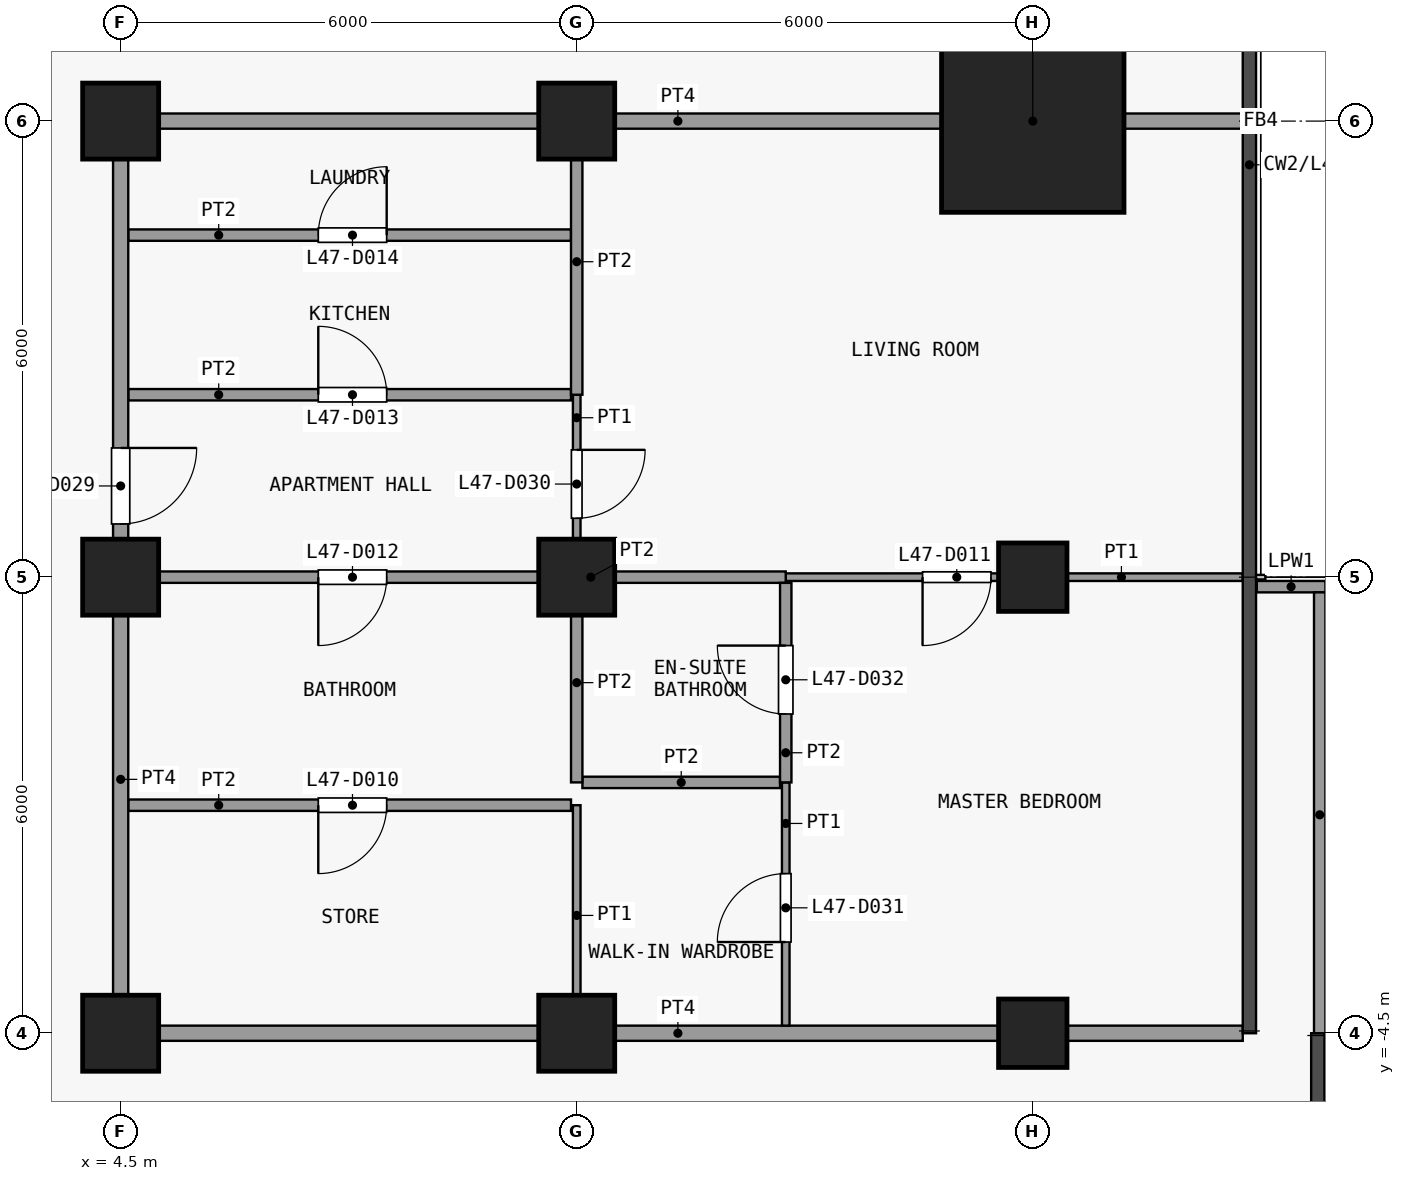
"""IFC4 building model, lengths in metres.
Left out: names, types, materials, properties, quantities, classifications, styles, units other than length and angle.
Written with IfcOpenShell. Run it as: python <this file> out.ifc"""

import sys

from ifc_helpers import new_model, si_unit, direction, frame, frame_2d, origin, origin_2d, place, context, subcontext, project, spatial, rectangle, extrude, element, fill, save


model = new_model("IFC4")
c1 = context("Model", 3, precision=1e-05, world=origin(), true_north=direction((0.0, 1.0)))
c2 = subcontext(c1, "Body", "Model", "MODEL_VIEW")
j1 = project(units=[si_unit("LENGTHUNIT", "METRE"), si_unit("PLANEANGLEUNIT", "RADIAN")], contexts=[c1])
p1 = place(None, origin())
s1 = spatial("IfcSite", under=j1, at=p1, CompositionType="ELEMENT")
p2 = place(p1, origin())
s2 = spatial("IfcBuilding", under=s1, at=p2, CompositionType="ELEMENT")
p3 = place(p2, frame((0.0, 0.0, 188.9)))
s3 = spatial("IfcBuildingStorey", under=s2, at=p3, CompositionType="ELEMENT", Elevation=188.9)
for number, where, z_axis, x_axis in (
    (1, (4.5, -4.5, 0.0), (0.0, 0.0, 1.0), (1.0, 0.0, 0.0)),
    (2, (4.5, 1.5, 0.0), (0.0, 0.0, 1.0), (1.0, 0.0, 0.0)),
    (3, (4.5, 7.5, 0.0), (0.0, 0.0, 1.0), (1.0, 0.0, 0.0)),
    (4, (10.5, -4.5, 0.0), (0.0, 0.0, 1.0), (1.0, 0.0, 0.0)),
    (5, (10.5, 1.5, 0.0), (0.0, 0.0, 1.0), (1.0, 0.0, 0.0)),
    (6, (10.5, 7.5, 0.0), (0.0, 0.0, 1.0), (1.0, 0.0, 0.0)),
):
    element("IfcColumn", number, at=place(p3, frame(where, z_axis=z_axis, x_axis=x_axis)), inside=s3, PredefinedType="COLUMN", context=c2, shape_type="SweptSolid", body=[
        extrude(rectangle(XDim=1.0, YDim=1.0, at=origin_2d()), origin(), (0.0, 0.0, 1.0), 3.6),
    ])
for number, where, z_axis, x_axis in (
    (7, (16.5, -4.5, 0.0), (0.0, 0.0, 1.0), (1.0, 0.0, 0.0)),
    (8, (16.5, 1.5, 0.0), (0.0, 0.0, 1.0), (1.0, 0.0, 0.0)),
):
    element("IfcColumn", number, at=place(p3, frame(where, z_axis=z_axis, x_axis=x_axis)), inside=s3, PredefinedType="COLUMN", context=c2, shape_type="SweptSolid", body=[
        extrude(rectangle(XDim=0.9, YDim=0.9, at=origin_2d()), origin(), (0.0, 0.0, 1.0), 3.6),
    ])
p4 = place(p3, frame((16.5, 7.5, 0.0), z_axis=(0.0, 0.0, 1.0), x_axis=(1.0, 0.0, 0.0)))
e9 = element("IfcColumn", 9, at=p4, inside=s3, PredefinedType="COLUMN", context=c2, shape_type="SweptSolid", body=[
    extrude(rectangle(XDim=2.4, YDim=2.4, at=origin_2d()), origin(), (0.0, 0.0, 1.0), 3.6),
])
p5 = place(p3, frame((19.448, 1.375, 0.0), z_axis=(0.0, 0.0, 1.0), x_axis=(1.0, 0.0, 0.0)))
e10 = element("IfcWall", 10, at=p5, inside=s3, PredefinedType="PARAPET", context=c2, shape_type="SweptSolid", body=[
    extrude(rectangle(XDim=0.903, YDim=0.15, at=frame_2d((0.451, 0.0))), origin(), (0.0, 0.0, 1.0), 1.15),
])
p6 = place(p3, frame((20.275, 1.3, 0.0), z_axis=(0.0, 0.0, 1.0), x_axis=(0.0, -1.0, 0.0)))
e11 = element("IfcWall", 11, at=p6, inside=s3, PredefinedType="PARAPET", context=c2, shape_type="SweptSolid", body=[
    extrude(rectangle(XDim=5.853, YDim=0.15, at=frame_2d((2.926, 0.0))), origin(), (0.0, 0.0, 1.0), 1.15),
])
p7 = place(p3, frame((4.4, -4.5, 0.0), z_axis=(0.0, 0.0, 1.0), x_axis=(1.0, 0.0, 0.0)))
e12 = element("IfcWall", 12, at=p7, inside=s3, PredefinedType="PARTITIONING", context=c2, shape_type="SweptSolid", body=[
    extrude(rectangle(XDim=14.863, YDim=0.2, at=frame_2d((7.431, 0.0))), origin(), (0.0, 0.0, 1.0), 3.3),
])
p8 = place(p3, frame((4.6, -1.5, 0.0), z_axis=(0.0, 0.0, 1.0), x_axis=(1.0, 0.0, 0.0)))
e13 = element("IfcWall", 13, at=p8, inside=s3, PredefinedType="PARTITIONING", context=c2, shape_type="SweptSolid", body=[
    extrude(rectangle(XDim=5.825, YDim=0.15, at=frame_2d((2.913, 0.0))), origin(), (0.0, 0.0, 1.0), 3.3),
])
p9 = place(p8, frame((2.5, 0.0, 0.0)))
e14 = element("IfcOpeningElement", 14, at=p9, cuts=e13, PredefinedType="OPENING", context=c2, shape_type="SweptSolid", body=[
    extrude(rectangle(XDim=0.9, YDim=2.1, at=frame_2d((0.45, 1.05))), frame((0.0, 0.085, 0.0), z_axis=(0.0, -1.0, 0.0), x_axis=(1.0, 0.0, 0.0)), (0.0, 0.0, 1.0), 0.17),
])
p10 = place(p3, frame((10.575, -1.2, 0.0), z_axis=(0.0, 0.0, 1.0), x_axis=(1.0, 0.0, 0.0)))
e15 = element("IfcWall", 15, at=p10, inside=s3, PredefinedType="PARTITIONING", context=c2, shape_type="SweptSolid", body=[
    extrude(rectangle(XDim=2.6, YDim=0.15, at=frame_2d((1.3, 0.0))), origin(), (0.0, 0.0, 1.0), 3.3),
])
p11 = place(p3, frame((13.25, 1.5, 0.0), z_axis=(0.0, 0.0, 1.0), x_axis=(1.0, 0.0, 0.0)))
e16 = element("IfcWall", 16, at=p11, inside=s3, PredefinedType="PARTITIONING", context=c2, shape_type="SweptSolid", body=[
    extrude(rectangle(XDim=6.012, YDim=0.1, at=frame_2d((3.006, 0.0))), origin(), (0.0, 0.0, 1.0), 3.3),
])
p12 = place(p11, frame((1.8, 0.0, 0.0)))
e17 = element("IfcOpeningElement", 17, at=p12, cuts=e16, PredefinedType="OPENING", context=c2, shape_type="SweptSolid", body=[
    extrude(rectangle(XDim=0.9, YDim=2.1, at=frame_2d((0.45, 1.05))), frame((0.0, 0.06, 0.0), z_axis=(0.0, -1.0, 0.0), x_axis=(1.0, 0.0, 0.0)), (0.0, 0.0, 1.0), 0.12),
])
p13 = place(p3, frame((4.6, 1.5, 0.0), z_axis=(0.0, 0.0, 1.0), x_axis=(1.0, 0.0, 0.0)))
e18 = element("IfcWall", 18, at=p13, inside=s3, PredefinedType="PARTITIONING", context=c2, shape_type="SweptSolid", body=[
    extrude(rectangle(XDim=8.65, YDim=0.15, at=frame_2d((4.325, 0.0))), origin(), (0.0, 0.0, 1.0), 3.3),
])
p14 = place(p13, frame((2.5, 0.0, 0.0)))
e19 = element("IfcOpeningElement", 19, at=p14, cuts=e18, PredefinedType="OPENING", context=c2, shape_type="SweptSolid", body=[
    extrude(rectangle(XDim=0.9, YDim=2.1, at=frame_2d((0.45, 1.05))), frame((0.0, 0.085, 0.0), z_axis=(0.0, -1.0, 0.0), x_axis=(1.0, 0.0, 0.0)), (0.0, 0.0, 1.0), 0.17),
])
p15 = place(p3, frame((4.6, 3.9, 0.0), z_axis=(0.0, 0.0, 1.0), x_axis=(1.0, 0.0, 0.0)))
e20 = element("IfcWall", 20, at=p15, inside=s3, PredefinedType="PARTITIONING", context=c2, shape_type="SweptSolid", body=[
    extrude(rectangle(XDim=5.825, YDim=0.15, at=frame_2d((2.913, 0.0))), origin(), (0.0, 0.0, 1.0), 3.3),
])
p16 = place(p15, frame((2.5, 0.0, 0.0)))
e21 = element("IfcOpeningElement", 21, at=p16, cuts=e20, PredefinedType="OPENING", context=c2, shape_type="SweptSolid", body=[
    extrude(rectangle(XDim=0.9, YDim=2.1, at=frame_2d((0.45, 1.05))), frame((0.0, 0.085, 0.0), z_axis=(0.0, -1.0, 0.0), x_axis=(1.0, 0.0, 0.0)), (0.0, 0.0, 1.0), 0.17),
])
p17 = place(p3, frame((4.6, 6.0, 0.0), z_axis=(0.0, 0.0, 1.0), x_axis=(1.0, 0.0, 0.0)))
e22 = element("IfcWall", 22, at=p17, inside=s3, PredefinedType="PARTITIONING", context=c2, shape_type="SweptSolid", body=[
    extrude(rectangle(XDim=5.825, YDim=0.15, at=frame_2d((2.913, 0.0))), origin(), (0.0, 0.0, 1.0), 3.3),
])
p18 = place(p17, frame((2.5, 0.0, 0.0)))
e23 = element("IfcOpeningElement", 23, at=p18, cuts=e22, PredefinedType="OPENING", context=c2, shape_type="SweptSolid", body=[
    extrude(rectangle(XDim=0.9, YDim=2.1, at=frame_2d((0.45, 1.05))), frame((0.0, 0.085, 0.0), z_axis=(0.0, -1.0, 0.0), x_axis=(1.0, 0.0, 0.0)), (0.0, 0.0, 1.0), 0.17),
])
p19 = place(p3, frame((4.4, 7.5, 0.0), z_axis=(0.0, 0.0, 1.0), x_axis=(1.0, 0.0, 0.0)))
e24 = element("IfcWall", 24, at=p19, inside=s3, PredefinedType="PARTITIONING", context=c2, shape_type="SweptSolid", body=[
    extrude(rectangle(XDim=14.863, YDim=0.2, at=frame_2d((7.431, 0.0))), origin(), (0.0, 0.0, 1.0), 3.3),
])
p20 = place(p3, frame((4.5, -4.4, 0.0), z_axis=(0.0, 0.0, 1.0), x_axis=(0.0, 1.0, 0.0)))
e25 = element("IfcWall", 25, at=p20, inside=s3, PredefinedType="PARTITIONING", context=c2, shape_type="SweptSolid", body=[
    extrude(rectangle(XDim=11.8, YDim=0.2, at=frame_2d((5.9, 0.0))), origin(), (0.0, 0.0, 1.0), 3.3),
])
p21 = place(p20, frame((6.6, 0.0, 0.0)))
e26 = element("IfcOpeningElement", 26, at=p21, cuts=e25, PredefinedType="OPENING", context=c2, shape_type="SweptSolid", body=[
    extrude(rectangle(XDim=1.0, YDim=2.1, at=frame_2d((0.5, 1.05))), frame((0.0, 0.11, 0.0), z_axis=(0.0, -1.0, 0.0), x_axis=(1.0, 0.0, 0.0)), (0.0, 0.0, 1.0), 0.22),
])
p22 = place(p3, frame((10.5, -4.4, 0.0), z_axis=(0.0, 0.0, 1.0), x_axis=(0.0, 1.0, 0.0)))
e27 = element("IfcWall", 27, at=p22, inside=s3, PredefinedType="PARTITIONING", context=c2, shape_type="SweptSolid", body=[
    extrude(rectangle(XDim=2.9, YDim=0.1, at=frame_2d((1.45, 0.0))), origin(), (0.0, 0.0, 1.0), 3.3),
])
p23 = place(p3, frame((10.5, 1.575, 0.0), z_axis=(0.0, 0.0, 1.0), x_axis=(0.0, 1.0, 0.0)))
e28 = element("IfcWall", 28, at=p23, inside=s3, PredefinedType="PARTITIONING", context=c2, shape_type="SweptSolid", body=[
    extrude(rectangle(XDim=2.325, YDim=0.1, at=frame_2d((1.163, 0.0))), origin(), (0.0, 0.0, 1.0), 3.3),
])
p24 = place(p23, frame((0.7, 0.0, 0.0)))
e29 = element("IfcOpeningElement", 29, at=p24, cuts=e28, PredefinedType="OPENING", context=c2, shape_type="SweptSolid", body=[
    extrude(rectangle(XDim=0.9, YDim=2.1, at=frame_2d((0.45, 1.05))), frame((0.0, 0.06, 0.0), z_axis=(0.0, -1.0, 0.0), x_axis=(1.0, 0.0, 0.0)), (0.0, 0.0, 1.0), 0.12),
])
p25 = place(p3, frame((10.5, -1.2, 0.0), z_axis=(0.0, 0.0, 1.0), x_axis=(0.0, 1.0, 0.0)))
e30 = element("IfcWall", 30, at=p25, inside=s3, PredefinedType="PARTITIONING", context=c2, shape_type="SweptSolid", body=[
    extrude(rectangle(XDim=2.625, YDim=0.15, at=frame_2d((1.312, 0.0))), origin(), (0.0, 0.0, 1.0), 3.3),
])
p26 = place(p3, frame((10.5, 3.9, 0.0), z_axis=(0.0, 0.0, 1.0), x_axis=(0.0, 1.0, 0.0)))
e31 = element("IfcWall", 31, at=p26, inside=s3, PredefinedType="PARTITIONING", context=c2, shape_type="SweptSolid", body=[
    extrude(rectangle(XDim=3.5, YDim=0.15, at=frame_2d((1.75, 0.0))), origin(), (0.0, 0.0, 1.0), 3.3),
])
p27 = place(p3, frame((13.25, -4.4, 0.0), z_axis=(0.0, 0.0, 1.0), x_axis=(0.0, 1.0, 0.0)))
e32 = element("IfcWall", 32, at=p27, inside=s3, PredefinedType="PARTITIONING", context=c2, shape_type="SweptSolid", body=[
    extrude(rectangle(XDim=3.2, YDim=0.1, at=frame_2d((1.6, 0.0))), origin(), (0.0, 0.0, 1.0), 3.3),
])
p28 = place(p27, frame((1.1, 0.0, 0.0)))
e33 = element("IfcOpeningElement", 33, at=p28, cuts=e32, PredefinedType="OPENING", context=c2, shape_type="SweptSolid", body=[
    extrude(rectangle(XDim=0.9, YDim=2.1, at=frame_2d((0.45, 1.05))), frame((0.0, 0.06, 0.0), z_axis=(0.0, -1.0, 0.0), x_axis=(1.0, 0.0, 0.0)), (0.0, 0.0, 1.0), 0.12),
])
p29 = place(p3, frame((13.25, -1.2, 0.0), z_axis=(0.0, 0.0, 1.0), x_axis=(0.0, 1.0, 0.0)))
e34 = element("IfcWall", 34, at=p29, inside=s3, PredefinedType="PARTITIONING", context=c2, shape_type="SweptSolid", body=[
    extrude(rectangle(XDim=2.625, YDim=0.15, at=frame_2d((1.312, 0.0))), origin(), (0.0, 0.0, 1.0), 3.3),
])
p30 = place(p29, frame((0.9, 0.0, 0.0)))
e35 = element("IfcOpeningElement", 35, at=p30, cuts=e34, PredefinedType="OPENING", context=c2, shape_type="SweptSolid", body=[
    extrude(rectangle(XDim=0.9, YDim=2.1, at=frame_2d((0.45, 1.05))), frame((0.0, 0.085, 0.0), z_axis=(0.0, -1.0, 0.0), x_axis=(1.0, 0.0, 0.0)), (0.0, 0.0, 1.0), 0.17),
])
p31 = place(p9, origin())
e36 = element("IfcDoor", 36, at=p31, inside=s3, OperationType="SINGLE_SWING_LEFT", PredefinedType="DOOR", context=c2, shape_type="SweptSolid", body=[
    extrude(rectangle(XDim=0.9, YDim=2.1, at=frame_2d((0.45, 1.05))), frame((0.0, 0.025, 0.0), z_axis=(0.0, -1.0, 0.0), x_axis=(1.0, 0.0, 0.0)), (0.0, 0.0, 1.0), 0.05),
])
fill(e14, e36)
p32 = place(p12, origin())
e37 = element("IfcDoor", 37, at=p32, inside=s3, OperationType="SINGLE_SWING_LEFT", PredefinedType="DOOR", context=c2, shape_type="SweptSolid", body=[
    extrude(rectangle(XDim=0.9, YDim=2.1, at=frame_2d((0.45, 1.05))), frame((0.0, 0.025, 0.0), z_axis=(0.0, -1.0, 0.0), x_axis=(1.0, 0.0, 0.0)), (0.0, 0.0, 1.0), 0.05),
])
fill(e17, e37)
p33 = place(p14, origin())
e38 = element("IfcDoor", 38, at=p33, inside=s3, OperationType="SINGLE_SWING_LEFT", PredefinedType="DOOR", context=c2, shape_type="SweptSolid", body=[
    extrude(rectangle(XDim=0.9, YDim=2.1, at=frame_2d((0.45, 1.05))), frame((0.0, 0.025, 0.0), z_axis=(0.0, -1.0, 0.0), x_axis=(1.0, 0.0, 0.0)), (0.0, 0.0, 1.0), 0.05),
])
fill(e19, e38)
p34 = place(p16, origin())
e39 = element("IfcDoor", 39, at=p34, inside=s3, OperationType="SINGLE_SWING_RIGHT", PredefinedType="DOOR", context=c2, shape_type="SweptSolid", body=[
    extrude(rectangle(XDim=0.9, YDim=2.1, at=frame_2d((0.45, 1.05))), frame((0.0, 0.025, 0.0), z_axis=(0.0, -1.0, 0.0), x_axis=(1.0, 0.0, 0.0)), (0.0, 0.0, 1.0), 0.05),
])
fill(e21, e39)
p35 = place(p18, origin())
e40 = element("IfcDoor", 40, at=p35, inside=s3, OperationType="SINGLE_SWING_LEFT", PredefinedType="DOOR", context=c2, shape_type="SweptSolid", body=[
    extrude(rectangle(XDim=0.9, YDim=2.1, at=frame_2d((0.45, 1.05))), frame((0.0, 0.025, 0.0), z_axis=(0.0, -1.0, 0.0), x_axis=(1.0, 0.0, 0.0)), (0.0, 0.0, 1.0), 0.05),
])
fill(e23, e40)
p36 = place(p21, origin())
e41 = element("IfcDoor", 41, at=p36, inside=s3, OperationType="SINGLE_SWING_RIGHT", PredefinedType="DOOR", context=c2, shape_type="SweptSolid", body=[
    extrude(rectangle(XDim=1.0, YDim=2.1, at=frame_2d((0.5, 1.05))), frame((0.0, 0.025, 0.0), z_axis=(0.0, -1.0, 0.0), x_axis=(1.0, 0.0, 0.0)), (0.0, 0.0, 1.0), 0.05),
])
fill(e26, e41)
p37 = place(p24, origin())
e42 = element("IfcDoor", 42, at=p37, inside=s3, OperationType="SINGLE_SWING_RIGHT", PredefinedType="DOOR", context=c2, shape_type="SweptSolid", body=[
    extrude(rectangle(XDim=0.9, YDim=2.1, at=frame_2d((0.45, 1.05))), frame((0.0, 0.025, 0.0), z_axis=(0.0, -1.0, 0.0), x_axis=(1.0, 0.0, 0.0)), (0.0, 0.0, 1.0), 0.05),
])
fill(e29, e42)
p38 = place(p28, origin())
e43 = element("IfcDoor", 43, at=p38, inside=s3, OperationType="SINGLE_SWING_RIGHT", PredefinedType="DOOR", context=c2, shape_type="SweptSolid", body=[
    extrude(rectangle(XDim=0.9, YDim=2.1, at=frame_2d((0.45, 1.05))), frame((0.0, 0.025, 0.0), z_axis=(0.0, -1.0, 0.0), x_axis=(1.0, 0.0, 0.0)), (0.0, 0.0, 1.0), 0.05),
])
fill(e33, e43)
p39 = place(p30, origin())
e44 = element("IfcDoor", 44, at=p39, inside=s3, OperationType="SINGLE_SWING_LEFT", PredefinedType="DOOR", context=c2, shape_type="SweptSolid", body=[
    extrude(rectangle(XDim=0.9, YDim=2.1, at=frame_2d((0.45, 1.05))), frame((0.0, 0.025, 0.0), z_axis=(0.0, -1.0, 0.0), x_axis=(1.0, 0.0, 0.0)), (0.0, 0.0, 1.0), 0.05),
])
fill(e35, e44)
save(model, sys.argv[1])
